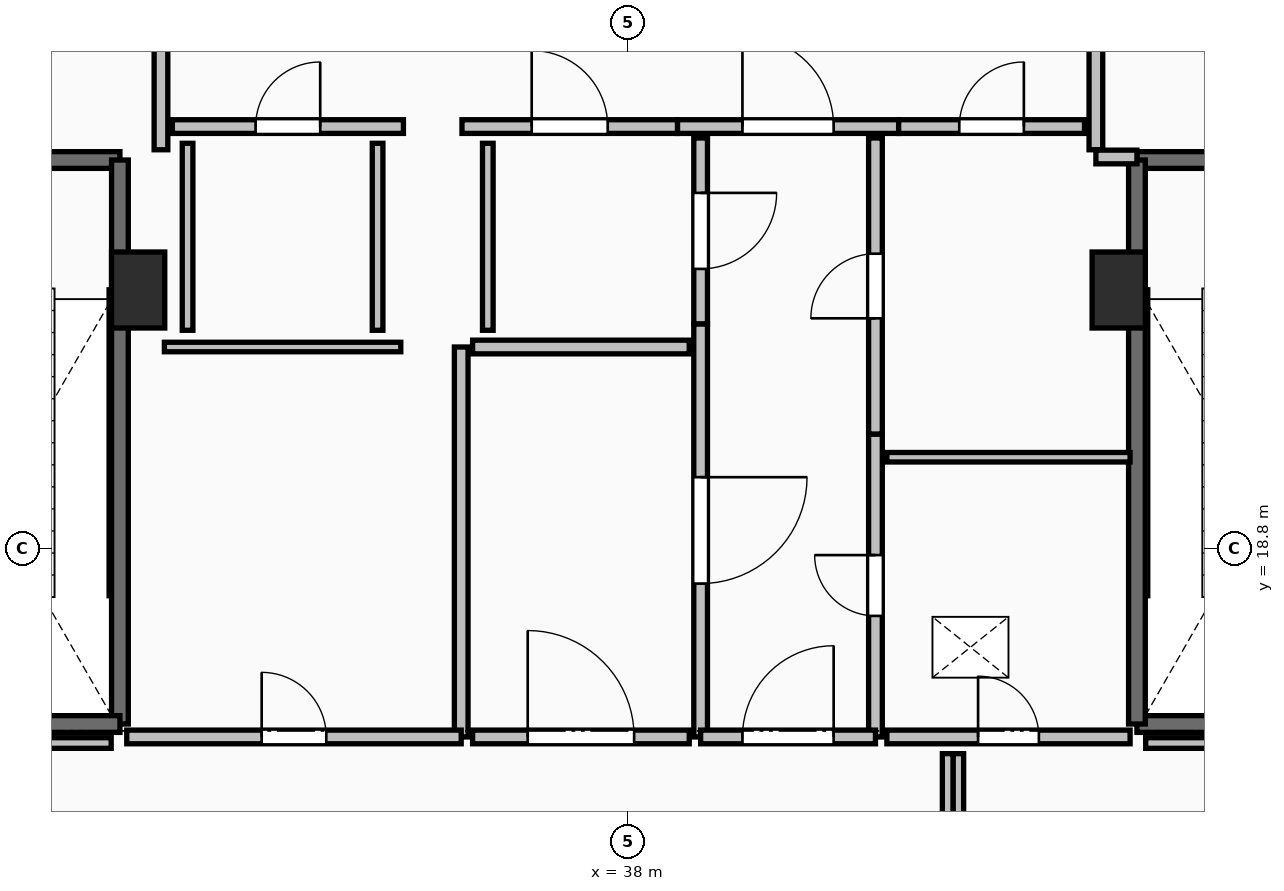
"""IFC4 building model, lengths in metres.
Left out: names, types, materials, properties, quantities, classifications, styles, units other than length and angle.
Written with IfcOpenShell. Run it as: python <this file> out.ifc"""

import sys

from ifc_helpers import new_model, si_unit, direction, frame, frame_2d, origin, origin_2d, place, context, subcontext, project, spatial, rectangle, extrude, element, fill, save


model = new_model("IFC4")
c1 = context("Model", 3, precision=1e-05, world=origin(), true_north=direction((0.0, 1.0)))
c2 = subcontext(c1, "Body", "Model", "MODEL_VIEW")
j1 = project(units=[si_unit("LENGTHUNIT", "METRE"), si_unit("PLANEANGLEUNIT", "RADIAN")], contexts=[c1])
p1 = place(None, origin())
s1 = spatial("IfcSite", under=j1, at=p1, CompositionType="ELEMENT")
p2 = place(p1, origin())
s2 = spatial("IfcBuilding", under=s1, at=p2, CompositionType="ELEMENT")
p3 = place(p2, frame((0.0, 0.0, 285.4)))
s3 = spatial("IfcBuildingStorey", under=s2, at=p3, CompositionType="ELEMENT", Elevation=285.4)
for number, where, z_axis, x_axis in (
    (1, (31.55, 22.2, 0.0), (0.0, 0.0, 1.0), (1.0, 0.0, 0.0)),
    (2, (44.45, 22.2, 0.0), (0.0, 0.0, 1.0), (1.0, 0.0, 0.0)),
):
    element("IfcColumn", number, at=place(p3, frame(where, z_axis=z_axis, x_axis=x_axis)), inside=s3, PredefinedType="PILASTER", context=c2, shape_type="SweptSolid", body=[
        extrude(rectangle(XDim=0.7, YDim=1.0, at=origin_2d()), origin(), (0.0, 0.0, 1.0), 5.0),
    ])
p4 = place(p3, frame((27.94, 23.91, 0.0), z_axis=(0.0, 0.0, 1.0), x_axis=(1.0, 0.0, 0.0)))
e3 = element("IfcWall", 3, at=p4, inside=s3, PredefinedType="SOLIDWALL", context=c2, shape_type="SweptSolid", body=[
    extrude(rectangle(XDim=3.37, YDim=0.22, at=frame_2d((1.685, 0.0))), origin(), (0.0, 0.0, 1.0), 4.69),
])
p5 = place(p4, frame((1.135, 0.0, 0.0)))
e4 = element("IfcOpeningElement", 4, at=p5, cuts=e3, PredefinedType="OPENING", context=c2, shape_type="SweptSolid", body=[
    extrude(rectangle(XDim=1.1, YDim=2.15, at=frame_2d((0.55, 1.075))), frame((0.0, 0.125, 0.0), z_axis=(0.0, -1.0, 0.0), x_axis=(1.0, 0.0, 0.0)), (0.0, 0.0, 1.0), 0.25),
])
p6 = place(p3, frame((31.31, 23.91, 0.0), z_axis=(0.0, 0.0, 1.0), x_axis=(0.0, -1.0, 0.0)))
e5 = element("IfcWall", 5, at=p6, inside=s3, PredefinedType="SOLIDWALL", context=c2, shape_type="SweptSolid", body=[
    extrude(rectangle(XDim=7.42, YDim=0.22, at=frame_2d((3.71, 0.0))), origin(), (0.0, 0.0, 1.0), 4.69),
])
p7 = place(p3, frame((31.31, 16.49, 0.0), z_axis=(0.0, 0.0, 1.0), x_axis=(-1.0, 0.0, 0.0)))
e6 = element("IfcWall", 6, at=p7, inside=s3, PredefinedType="SOLIDWALL", context=c2, shape_type="SweptSolid", body=[
    extrude(rectangle(XDim=3.37, YDim=0.22, at=frame_2d((1.685, 0.0))), origin(), (0.0, 0.0, 1.0), 4.69),
])
p8 = place(p3, frame((44.69, 23.91, 0.0), z_axis=(0.0, 0.0, 1.0), x_axis=(1.0, 0.0, 0.0)))
e7 = element("IfcWall", 7, at=p8, inside=s3, PredefinedType="SOLIDWALL", context=c2, shape_type="SweptSolid", body=[
    extrude(rectangle(XDim=3.37, YDim=0.22, at=frame_2d((1.685, 0.0))), origin(), (0.0, 0.0, 1.0), 4.69),
])
p9 = place(p8, frame((1.135, 0.0, 0.0)))
e8 = element("IfcOpeningElement", 8, at=p9, cuts=e7, PredefinedType="OPENING", context=c2, shape_type="SweptSolid", body=[
    extrude(rectangle(XDim=1.1, YDim=2.15, at=frame_2d((0.55, 1.075))), frame((0.0, 0.125, 0.0), z_axis=(0.0, -1.0, 0.0), x_axis=(1.0, 0.0, 0.0)), (0.0, 0.0, 1.0), 0.25),
])
p10 = place(p3, frame((48.06, 16.49, 0.0), z_axis=(0.0, 0.0, 1.0), x_axis=(-1.0, 0.0, 0.0)))
e9 = element("IfcWall", 9, at=p10, inside=s3, PredefinedType="SOLIDWALL", context=c2, shape_type="SweptSolid", body=[
    extrude(rectangle(XDim=3.37, YDim=0.22, at=frame_2d((1.685, 0.0))), origin(), (0.0, 0.0, 1.0), 4.69),
])
p11 = place(p3, frame((44.69, 16.49, 0.0), z_axis=(0.0, 0.0, 1.0), x_axis=(0.0, 1.0, 0.0)))
e10 = element("IfcWall", 10, at=p11, inside=s3, PredefinedType="SOLIDWALL", context=c2, shape_type="SweptSolid", body=[
    extrude(rectangle(XDim=7.42, YDim=0.22, at=frame_2d((3.71, 0.0))), origin(), (0.0, 0.0, 1.0), 4.69),
])
p12 = place(p3, frame((31.85, 24.045, 0.0), z_axis=(0.0, 0.0, 1.0), x_axis=(0.0, 1.0, 0.0)))
e11 = element("IfcWall", 11, at=p12, inside=s3, PredefinedType="PARTITIONING", context=c2, shape_type="SweptSolid", body=[
    extrude(rectangle(XDim=3.91, YDim=0.18, at=frame_2d((1.955, 0.0))), origin(), (0.0, 0.0, 1.0), 4.69),
])
p13 = place(p12, frame((1.355, 0.0, 0.0)))
e12 = element("IfcOpeningElement", 12, at=p13, cuts=e11, PredefinedType="OPENING", context=c2, shape_type="SweptSolid", body=[
    extrude(rectangle(XDim=1.2, YDim=2.15, at=frame_2d((0.6, 1.075))), frame((0.0, 0.105, 0.0), z_axis=(0.0, -1.0, 0.0), x_axis=(1.0, 0.0, 0.0)), (0.0, 0.0, 1.0), 0.21),
])
p14 = place(p3, frame((44.15, 27.955, 0.0), z_axis=(0.0, 0.0, 1.0), x_axis=(0.0, -1.0, 0.0)))
e13 = element("IfcWall", 13, at=p14, inside=s3, PredefinedType="PARTITIONING", context=c2, shape_type="SweptSolid", body=[
    extrude(rectangle(XDim=3.91, YDim=0.18, at=frame_2d((1.955, 0.0))), origin(), (0.0, 0.0, 1.0), 4.69),
])
p15 = place(p14, frame((1.355, 0.0, 0.0)))
e14 = element("IfcOpeningElement", 14, at=p15, cuts=e13, PredefinedType="OPENING", context=c2, shape_type="SweptSolid", body=[
    extrude(rectangle(XDim=1.2, YDim=2.15, at=frame_2d((0.6, 1.075))), frame((0.0, 0.105, 0.0), z_axis=(0.0, -1.0, 0.0), x_axis=(1.0, 0.0, 0.0)), (0.0, 0.0, 1.0), 0.21),
])
p16 = place(p3, frame((44.15, 23.95, 0.0), z_axis=(0.0, 0.0, 1.0), x_axis=(1.0, 0.0, 0.0)))
e15 = element("IfcWall", 15, at=p16, inside=s3, PredefinedType="PARTITIONING", context=c2, shape_type="SweptSolid", body=[
    extrude(rectangle(XDim=0.54, YDim=0.18, at=frame_2d((0.27, 0.0))), origin(), (0.0, 0.0, 1.0), 4.69),
])
p17 = place(p3, frame((38.645, 24.35, 0.0), z_axis=(0.0, 0.0, 1.0), x_axis=(1.0, 0.0, 0.0)))
e16 = element("IfcWall", 16, at=p17, inside=s3, PredefinedType="PARTITIONING", context=c2, shape_type="SweptSolid", body=[
    extrude(rectangle(XDim=2.91, YDim=0.18, at=frame_2d((1.455, 0.0))), origin(), (0.0, 0.0, 1.0), 4.69),
])
p18 = place(p17, frame((0.855, 0.0, 0.0)))
e17 = element("IfcOpeningElement", 17, at=p18, cuts=e16, PredefinedType="OPENING", context=c2, shape_type="SweptSolid", body=[
    extrude(rectangle(XDim=1.2, YDim=2.15, at=frame_2d((0.6, 1.075))), frame((0.0, 0.105, 0.0), z_axis=(0.0, -1.0, 0.0), x_axis=(1.0, 0.0, 0.0)), (0.0, 0.0, 1.0), 0.21),
])
p19 = place(p3, frame((41.555, 24.35, 0.0), z_axis=(0.0, 0.0, 1.0), x_axis=(1.0, 0.0, 0.0)))
e18 = element("IfcWall", 18, at=p19, inside=s3, PredefinedType="PARTITIONING", context=c2, shape_type="SweptSolid", body=[
    extrude(rectangle(XDim=2.445, YDim=0.18, at=frame_2d((1.223, 0.0))), origin(), (0.0, 0.0, 1.0), 4.69),
])
p20 = place(p19, frame((0.798, 0.0, 0.0)))
e19 = element("IfcOpeningElement", 19, at=p20, cuts=e18, PredefinedType="OPENING", context=c2, shape_type="SweptSolid", body=[
    extrude(rectangle(XDim=0.85, YDim=2.1, at=frame_2d((0.425, 1.05))), frame((0.0, 0.105, 0.0), z_axis=(0.0, -1.0, 0.0), x_axis=(1.0, 0.0, 0.0)), (0.0, 0.0, 1.0), 0.21),
])
p21 = place(p3, frame((32.0, 24.35, 0.0), z_axis=(0.0, 0.0, 1.0), x_axis=(1.0, 0.0, 0.0)))
e20 = element("IfcWall", 20, at=p21, inside=s3, PredefinedType="PARTITIONING", context=c2, shape_type="SweptSolid", body=[
    extrude(rectangle(XDim=3.04, YDim=0.18, at=frame_2d((1.52, 0.0))), origin(), (0.0, 0.0, 1.0), 4.69),
])
p22 = place(p21, frame((1.095, 0.0, 0.0)))
e21 = element("IfcOpeningElement", 21, at=p22, cuts=e20, PredefinedType="OPENING", context=c2, shape_type="SweptSolid", body=[
    extrude(rectangle(XDim=0.85, YDim=2.1, at=frame_2d((0.425, 1.05))), frame((0.0, 0.105, 0.0), z_axis=(0.0, -1.0, 0.0), x_axis=(1.0, 0.0, 0.0)), (0.0, 0.0, 1.0), 0.21),
])
p23 = place(p3, frame((35.81, 24.35, 0.0), z_axis=(0.0, 0.0, 1.0), x_axis=(1.0, 0.0, 0.0)))
e22 = element("IfcWall", 22, at=p23, inside=s3, PredefinedType="PARTITIONING", context=c2, shape_type="SweptSolid", body=[
    extrude(rectangle(XDim=2.835, YDim=0.18, at=frame_2d((1.417, 0.0))), origin(), (0.0, 0.0, 1.0), 4.69),
])
p24 = place(p23, frame((0.917, 0.0, 0.0)))
e23 = element("IfcOpeningElement", 23, at=p24, cuts=e22, PredefinedType="OPENING", context=c2, shape_type="SweptSolid", body=[
    extrude(rectangle(XDim=1.0, YDim=2.15, at=frame_2d((0.5, 1.075))), frame((0.0, 0.105, 0.0), z_axis=(0.0, -1.0, 0.0), x_axis=(1.0, 0.0, 0.0)), (0.0, 0.0, 1.0), 0.21),
])
p25 = place(p3, frame((41.25, 16.32, 0.0), z_axis=(0.0, 0.0, 1.0), x_axis=(0.0, 1.0, 0.0)))
e24 = element("IfcWall", 24, at=p25, inside=s3, PredefinedType="PARTITIONING", context=c2, shape_type="SweptSolid", body=[
    extrude(rectangle(XDim=3.985, YDim=0.18, at=frame_2d((1.992, 0.0))), origin(), (0.0, 0.0, 1.0), 4.69),
])
p26 = place(p25, frame((1.593, 0.0, 0.0)))
e25 = element("IfcOpeningElement", 25, at=p26, cuts=e24, PredefinedType="OPENING", context=c2, shape_type="SweptSolid", body=[
    extrude(rectangle(XDim=0.8, YDim=2.05, at=frame_2d((0.4, 1.025))), frame((0.0, 0.105, 0.0), z_axis=(0.0, -1.0, 0.0), x_axis=(1.0, 0.0, 0.0)), (0.0, 0.0, 1.0), 0.21),
])
p27 = place(p3, frame((41.25, 20.305, 0.0), z_axis=(0.0, 0.0, 1.0), x_axis=(0.0, 1.0, 0.0)))
e26 = element("IfcWall", 26, at=p27, inside=s3, PredefinedType="PARTITIONING", context=c2, shape_type="SweptSolid", body=[
    extrude(rectangle(XDim=3.895, YDim=0.18, at=frame_2d((1.948, 0.0))), origin(), (0.0, 0.0, 1.0), 3.882),
])
p28 = place(p27, frame((1.522, 0.0, 0.0)))
e27 = element("IfcOpeningElement", 27, at=p28, cuts=e26, PredefinedType="OPENING", context=c2, shape_type="SweptSolid", body=[
    extrude(rectangle(XDim=0.85, YDim=2.1, at=frame_2d((0.425, 1.05))), frame((0.0, 0.105, 0.0), z_axis=(0.0, -1.0, 0.0), x_axis=(1.0, 0.0, 0.0)), (0.0, 0.0, 1.0), 0.21),
])
p29 = place(p3, frame((38.95, 21.755, 0.0), z_axis=(0.0, 0.0, 1.0), x_axis=(0.0, -1.0, 0.0)))
e28 = element("IfcWall", 28, at=p29, inside=s3, PredefinedType="PARTITIONING", context=c2, shape_type="SweptSolid", body=[
    extrude(rectangle(XDim=5.435, YDim=0.18, at=frame_2d((2.717, 0.0))), origin(), (0.0, 0.0, 1.0), 4.69),
])
p30 = place(p29, frame((2.018, 0.0, 0.0)))
e29 = element("IfcOpeningElement", 29, at=p30, cuts=e28, PredefinedType="OPENING", context=c2, shape_type="SweptSolid", body=[
    extrude(rectangle(XDim=1.4, YDim=2.2, at=frame_2d((0.7, 1.1))), frame((0.0, 0.105, 0.0), z_axis=(0.0, -1.0, 0.0), x_axis=(1.0, 0.0, 0.0)), (0.0, 0.0, 1.0), 0.21),
])
p31 = place(p3, frame((38.95, 24.2, 0.0), z_axis=(0.0, 0.0, 1.0), x_axis=(0.0, -1.0, 0.0)))
e30 = element("IfcWall", 30, at=p31, inside=s3, PredefinedType="PARTITIONING", context=c2, shape_type="SweptSolid", body=[
    extrude(rectangle(XDim=2.445, YDim=0.18, at=frame_2d((1.223, 0.0))), origin(), (0.0, 0.0, 1.0), 3.882),
])
p32 = place(p31, frame((0.722, 0.0, 0.0)))
e31 = element("IfcOpeningElement", 31, at=p32, cuts=e30, PredefinedType="OPENING", context=c2, shape_type="SweptSolid", body=[
    extrude(rectangle(XDim=1.0, YDim=2.15, at=frame_2d((0.5, 1.075))), frame((0.0, 0.105, 0.0), z_axis=(0.0, -1.0, 0.0), x_axis=(1.0, 0.0, 0.0)), (0.0, 0.0, 1.0), 0.21),
])
p33 = place(p3, frame((38.95, 16.32, 0.0), z_axis=(0.0, 0.0, 1.0), x_axis=(1.0, 0.0, 0.0)))
e32 = element("IfcWall", 32, at=p33, inside=s3, PredefinedType="PARTITIONING", context=c2, shape_type="SweptSolid", body=[
    extrude(rectangle(XDim=2.3, YDim=0.18, at=frame_2d((1.15, 0.0))), origin(), (0.0, 0.0, 1.0), 4.69),
])
p34 = place(p33, frame((0.55, 0.0, 0.0)))
e33 = element("IfcOpeningElement", 33, at=p34, cuts=e32, PredefinedType="OPENING", context=c2, shape_type="SweptSolid", body=[
    extrude(rectangle(XDim=1.2, YDim=2.15, at=frame_2d((0.6, 1.075))), frame((0.0, 0.105, 0.0), z_axis=(0.0, -1.0, 0.0), x_axis=(1.0, 0.0, 0.0)), (0.0, 0.0, 1.0), 0.21),
])
p35 = place(p3, frame((44.6, 20.0, 0.0), z_axis=(0.0, 0.0, 1.0), x_axis=(-1.0, 0.0, 0.0)))
e34 = element("IfcWall", 34, at=p35, inside=s3, PredefinedType="PARTITIONING", context=c2, shape_type="SweptSolid", body=[
    extrude(rectangle(XDim=3.2, YDim=0.125, at=frame_2d((1.6, 0.0))), origin(), (0.0, 0.0, 1.0), 4.69),
])
p36 = place(p3, frame((41.4, 16.32, 0.0), z_axis=(0.0, 0.0, 1.0), x_axis=(1.0, 0.0, 0.0)))
e35 = element("IfcWall", 35, at=p36, inside=s3, PredefinedType="PARTITIONING", context=c2, shape_type="SweptSolid", body=[
    extrude(rectangle(XDim=3.2, YDim=0.18, at=frame_2d((1.6, 0.0))), origin(), (0.0, 0.0, 1.0), 4.69),
])
p37 = place(p36, frame((1.2, 0.0, 0.0)))
e36 = element("IfcOpeningElement", 36, at=p37, cuts=e35, PredefinedType="OPENING", context=c2, shape_type="SweptSolid", body=[
    extrude(rectangle(XDim=0.8, YDim=2.05, at=frame_2d((0.4, 1.025))), frame((0.0, 0.105, 0.0), z_axis=(0.0, -1.0, 0.0), x_axis=(1.0, 0.0, 0.0)), (0.0, 0.0, 1.0), 0.21),
])
p38 = place(p3, frame((35.8, 16.32, 0.0), z_axis=(0.0, 0.0, 1.0), x_axis=(0.0, 1.0, 0.0)))
e37 = element("IfcWall", 37, at=p38, inside=s3, PredefinedType="PARTITIONING", context=c2, shape_type="SweptSolid", body=[
    extrude(rectangle(XDim=5.13, YDim=0.18, at=frame_2d((2.565, 0.0))), origin(), (0.0, 0.0, 1.0), 4.69),
])
p39 = place(p3, frame((35.005, 21.45, 0.0), z_axis=(0.0, 0.0, 1.0), x_axis=(-1.0, 0.0, 0.0)))
e38 = element("IfcWall", 38, at=p39, inside=s3, PredefinedType="PARTITIONING", context=c2, shape_type="SweptSolid", body=[
    extrude(rectangle(XDim=3.11, YDim=0.125, at=frame_2d((1.555, 0.0))), origin(), (0.0, 0.0, 1.0), 4.69),
])
p40 = place(p3, frame((31.4, 16.32, 0.0), z_axis=(0.0, 0.0, 1.0), x_axis=(1.0, 0.0, 0.0)))
e39 = element("IfcWall", 39, at=p40, inside=s3, PredefinedType="PARTITIONING", context=c2, shape_type="SweptSolid", body=[
    extrude(rectangle(XDim=4.4, YDim=0.18, at=frame_2d((2.2, 0.0))), origin(), (0.0, 0.0, 1.0), 4.69),
])
p41 = place(p40, frame((1.775, 0.0, 0.0)))
e40 = element("IfcOpeningElement", 40, at=p41, cuts=e39, PredefinedType="OPENING", context=c2, shape_type="SweptSolid", body=[
    extrude(rectangle(XDim=0.85, YDim=2.1, at=frame_2d((0.425, 1.05))), frame((0.0, 0.105, 0.0), z_axis=(0.0, -1.0, 0.0), x_axis=(1.0, 0.0, 0.0)), (0.0, 0.0, 1.0), 0.21),
])
p42 = place(p3, frame((38.8, 21.45, 0.0), z_axis=(0.0, 0.0, 1.0), x_axis=(-1.0, 0.0, 0.0)))
e41 = element("IfcWall", 41, at=p42, inside=s3, PredefinedType="PARTITIONING", context=c2, shape_type="SweptSolid", body=[
    extrude(rectangle(XDim=2.85, YDim=0.18, at=frame_2d((1.425, 0.0))), origin(), (0.0, 0.0, 1.0), 4.69),
])
p43 = place(p3, frame((35.95, 16.32, 0.0), z_axis=(0.0, 0.0, 1.0), x_axis=(1.0, 0.0, 0.0)))
e42 = element("IfcWall", 42, at=p43, inside=s3, PredefinedType="PARTITIONING", context=c2, shape_type="SweptSolid", body=[
    extrude(rectangle(XDim=2.85, YDim=0.18, at=frame_2d((1.425, 0.0))), origin(), (0.0, 0.0, 1.0), 4.69),
])
p44 = place(p43, frame((0.725, 0.0, 0.0)))
e43 = element("IfcOpeningElement", 43, at=p44, cuts=e42, PredefinedType="OPENING", context=c2, shape_type="SweptSolid", body=[
    extrude(rectangle(XDim=1.4, YDim=2.2, at=frame_2d((0.7, 1.1))), frame((0.0, 0.105, 0.0), z_axis=(0.0, -1.0, 0.0), x_axis=(1.0, 0.0, 0.0)), (0.0, 0.0, 1.0), 0.21),
])
for number, where, z_axis, x_axis in (
    (44, (32.2, 24.13, 0.0), (0.0, 0.0, 1.0), (0.0, -1.0, 0.0)),
    (45, (34.7, 21.67, 0.0), (0.0, 0.0, 1.0), (0.0, 1.0, 0.0)),
    (46, (36.15, 24.13, 0.0), (0.0, 0.0, 1.0), (0.0, -1.0, 0.0)),
):
    element("IfcWall", number, at=place(p3, frame(where, z_axis=z_axis, x_axis=x_axis)), inside=s3, PredefinedType="PARTITIONING", context=c2, shape_type="SweptSolid", body=[
        extrude(rectangle(XDim=2.46, YDim=0.14, at=frame_2d((1.23, 0.0))), origin(), (0.0, 0.0, 1.0), 3.882),
    ])
p45 = place(p3, frame((42.34, 14.25, 0.0), z_axis=(0.0, 0.0, 1.0), x_axis=(0.0, 1.0, 0.0)))
e47 = element("IfcWall", 47, at=p45, inside=s3, PredefinedType="PARTITIONING", context=c2, shape_type="SweptSolid", body=[
    extrude(rectangle(XDim=1.85, YDim=0.14, at=frame_2d((0.925, 0.0))), origin(), (0.0, 0.0, 1.0), 4.379),
])
for number, where, z_axis, x_axis in (
    (48, (44.805, 16.24, 0.0), (0.0, 0.0, 1.0), (1.0, 0.0, 0.0)),
    (49, (27.45, 16.24, 0.0), (0.0, 0.0, 1.0), (1.0, 0.0, 0.0)),
):
    element("IfcWall", number, at=place(p3, frame(where, z_axis=z_axis, x_axis=x_axis)), inside=s3, PredefinedType="PARTITIONING", context=c2, shape_type="SweptSolid", body=[
        extrude(rectangle(XDim=3.745, YDim=0.14, at=frame_2d((1.873, 0.0))), origin(), (0.0, 0.0, 1.0), 3.882),
    ])
p46 = place(p3, frame((42.2, 16.1, 0.0), z_axis=(0.0, 0.0, 1.0), x_axis=(0.0, -1.0, 0.0)))
e50 = element("IfcWall", 50, at=p46, inside=s3, PredefinedType="PARTITIONING", context=c2, shape_type="SweptSolid", body=[
    extrude(rectangle(XDim=1.85, YDim=0.14, at=frame_2d((0.925, 0.0))), origin(), (0.0, 0.0, 1.0), 4.379),
])
p47 = place(p18, origin())
e51 = element("IfcDoor", 51, at=p47, inside=s3, OperationType="SINGLE_SWING_LEFT", PredefinedType="DOOR", context=c2, shape_type="SweptSolid", body=[
    extrude(rectangle(XDim=1.2, YDim=2.15, at=frame_2d((0.6, 1.075))), frame((0.0, 0.025, 0.0), z_axis=(0.0, -1.0, 0.0), x_axis=(1.0, 0.0, 0.0)), (0.0, 0.0, 1.0), 0.05),
])
fill(e17, e51)
p48 = place(p20, origin())
e52 = element("IfcDoor", 52, at=p48, inside=s3, OperationType="SINGLE_SWING_RIGHT", PredefinedType="DOOR", context=c2, shape_type="SweptSolid", body=[
    extrude(rectangle(XDim=0.85, YDim=2.1, at=frame_2d((0.425, 1.05))), frame((0.0, 0.025, 0.0), z_axis=(0.0, -1.0, 0.0), x_axis=(1.0, 0.0, 0.0)), (0.0, 0.0, 1.0), 0.05),
])
fill(e19, e52)
p49 = place(p22, origin())
e53 = element("IfcDoor", 53, at=p49, inside=s3, OperationType="SINGLE_SWING_RIGHT", PredefinedType="DOOR", context=c2, shape_type="SweptSolid", body=[
    extrude(rectangle(XDim=0.85, YDim=2.1, at=frame_2d((0.425, 1.05))), frame((0.0, 0.025, 0.0), z_axis=(0.0, -1.0, 0.0), x_axis=(1.0, 0.0, 0.0)), (0.0, 0.0, 1.0), 0.05),
])
fill(e21, e53)
p50 = place(p24, origin())
e54 = element("IfcDoor", 54, at=p50, inside=s3, OperationType="SINGLE_SWING_LEFT", PredefinedType="DOOR", context=c2, shape_type="SweptSolid", body=[
    extrude(rectangle(XDim=1.0, YDim=2.15, at=frame_2d((0.5, 1.075))), frame((0.0, 0.025, 0.0), z_axis=(0.0, -1.0, 0.0), x_axis=(1.0, 0.0, 0.0)), (0.0, 0.0, 1.0), 0.05),
])
fill(e23, e54)
p51 = place(p26, origin())
e55 = element("IfcDoor", 55, at=p51, inside=s3, OperationType="SINGLE_SWING_RIGHT", PredefinedType="DOOR", context=c2, shape_type="SweptSolid", body=[
    extrude(rectangle(XDim=0.8, YDim=2.05, at=frame_2d((0.4, 1.025))), frame((0.0, 0.025, 0.0), z_axis=(0.0, -1.0, 0.0), x_axis=(1.0, 0.0, 0.0)), (0.0, 0.0, 1.0), 0.05),
])
fill(e25, e55)
p52 = place(p28, origin())
e56 = element("IfcDoor", 56, at=p52, inside=s3, OperationType="SINGLE_SWING_LEFT", PredefinedType="DOOR", context=c2, shape_type="SweptSolid", body=[
    extrude(rectangle(XDim=0.85, YDim=2.1, at=frame_2d((0.425, 1.05))), frame((0.0, 0.025, 0.0), z_axis=(0.0, -1.0, 0.0), x_axis=(1.0, 0.0, 0.0)), (0.0, 0.0, 1.0), 0.05),
])
fill(e27, e56)
p53 = place(p30, origin())
e57 = element("IfcDoor", 57, at=p53, inside=s3, OperationType="DOUBLE_SWING_LEFT", PredefinedType="DOOR", context=c2, shape_type="SweptSolid", body=[
    extrude(rectangle(XDim=1.4, YDim=2.2, at=frame_2d((0.7, 1.1))), frame((0.0, 0.025, 0.0), z_axis=(0.0, -1.0, 0.0), x_axis=(1.0, 0.0, 0.0)), (0.0, 0.0, 1.0), 0.05),
])
fill(e29, e57)
p54 = place(p32, origin())
e58 = element("IfcDoor", 58, at=p54, inside=s3, OperationType="SINGLE_SWING_LEFT", PredefinedType="DOOR", context=c2, shape_type="SweptSolid", body=[
    extrude(rectangle(XDim=1.0, YDim=2.15, at=frame_2d((0.5, 1.075))), frame((0.0, 0.025, 0.0), z_axis=(0.0, -1.0, 0.0), x_axis=(1.0, 0.0, 0.0)), (0.0, 0.0, 1.0), 0.05),
])
fill(e31, e58)
p55 = place(p34, origin())
e59 = element("IfcDoor", 59, at=p55, inside=s3, OperationType="SINGLE_SWING_RIGHT", PredefinedType="DOOR", context=c2, shape_type="SweptSolid", body=[
    extrude(rectangle(XDim=1.2, YDim=2.15, at=frame_2d((0.6, 1.075))), frame((0.0, 0.025, 0.0), z_axis=(0.0, -1.0, 0.0), x_axis=(1.0, 0.0, 0.0)), (0.0, 0.0, 1.0), 0.05),
])
fill(e33, e59)
p56 = place(p37, origin())
e60 = element("IfcDoor", 60, at=p56, inside=s3, OperationType="SINGLE_SWING_LEFT", PredefinedType="DOOR", context=c2, shape_type="SweptSolid", body=[
    extrude(rectangle(XDim=0.8, YDim=2.05, at=frame_2d((0.4, 1.025))), frame((0.0, 0.025, 0.0), z_axis=(0.0, -1.0, 0.0), x_axis=(1.0, 0.0, 0.0)), (0.0, 0.0, 1.0), 0.05),
])
fill(e36, e60)
p57 = place(p41, origin())
e61 = element("IfcDoor", 61, at=p57, inside=s3, OperationType="SINGLE_SWING_LEFT", PredefinedType="DOOR", context=c2, shape_type="SweptSolid", body=[
    extrude(rectangle(XDim=0.85, YDim=2.1, at=frame_2d((0.425, 1.05))), frame((0.0, 0.025, 0.0), z_axis=(0.0, -1.0, 0.0), x_axis=(1.0, 0.0, 0.0)), (0.0, 0.0, 1.0), 0.05),
])
fill(e40, e61)
p58 = place(p44, origin())
e62 = element("IfcDoor", 62, at=p58, inside=s3, OperationType="DOUBLE_SWING_LEFT", PredefinedType="DOOR", context=c2, shape_type="SweptSolid", body=[
    extrude(rectangle(XDim=1.4, YDim=2.2, at=frame_2d((0.7, 1.1))), frame((0.0, 0.025, 0.0), z_axis=(0.0, -1.0, 0.0), x_axis=(1.0, 0.0, 0.0)), (0.0, 0.0, 1.0), 0.05),
])
fill(e43, e62)
save(model, sys.argv[1])
